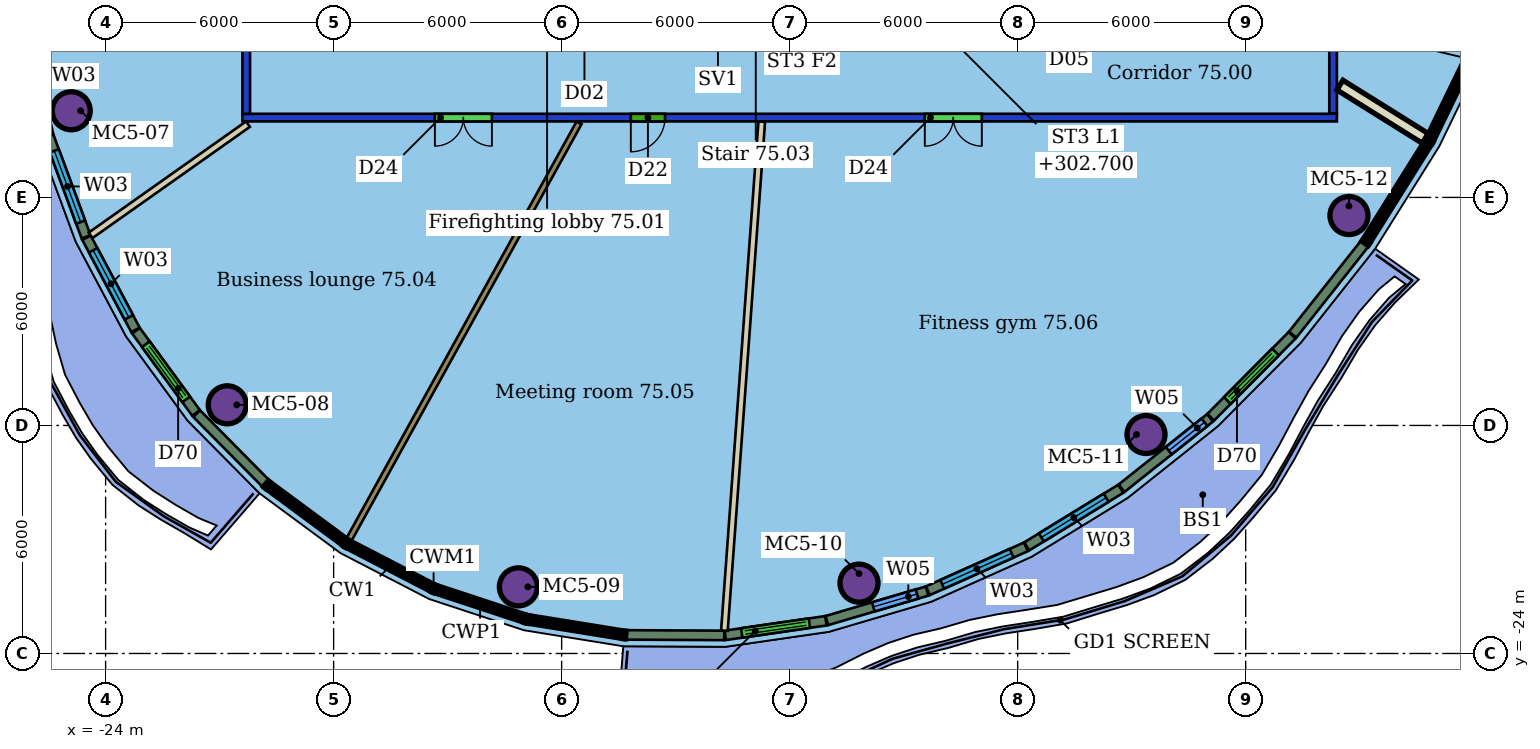
"""IFC4 building model, lengths in metres.
Left out: names, types, materials, properties, quantities, classifications, styles, units other than length and angle.
Written with IfcOpenShell. Run it as: python <this file> out.ifc"""

import sys

from ifc_helpers import new_model, si_unit, direction, frame, frame_2d, origin, origin_2d, place, context, subcontext, project, spatial, rectangle, hollow_circle, extrude, element, fill, save


model = new_model("IFC4")
c1 = context("Model", 3, precision=1e-05, world=origin(), true_north=direction((0.0, 1.0)))
c2 = subcontext(c1, "Body", "Model", "MODEL_VIEW")
j1 = project(units=[si_unit("LENGTHUNIT", "METRE"), si_unit("PLANEANGLEUNIT", "RADIAN")], contexts=[c1])
p1 = place(None, origin())
s1 = spatial("IfcSite", under=j1, at=p1, CompositionType="ELEMENT")
p2 = place(p1, origin())
s2 = spatial("IfcBuilding", under=s1, at=p2, CompositionType="ELEMENT")
p3 = place(p2, frame((0.0, 0.0, 300.9)))
s3 = spatial("IfcBuildingStorey", under=s2, at=p3, CompositionType="ELEMENT", Elevation=300.9)
for number, where, z_axis, x_axis in (
    (1, (-24.906, -9.72, 0.0), (0.0, 0.0, 1.0), (1.0, 0.0, 0.0)),
    (2, (-20.8, -17.457, 0.0), (0.0, 0.0, 1.0), (1.0, 0.0, 0.0)),
    (3, (-13.138, -22.247, 0.0), (0.0, 0.0, 1.0), (1.0, 0.0, 0.0)),
    (4, (-4.175, -22.149, 0.0), (0.0, 0.0, 1.0), (1.0, 0.0, 0.0)),
    (5, (3.377, -18.238, 0.0), (0.0, 0.0, 1.0), (1.0, 0.0, 0.0)),
    (6, (8.718, -12.477, 0.0), (0.0, 0.0, 1.0), (1.0, 0.0, 0.0)),
):
    element("IfcColumn", number, at=place(p3, frame(where, z_axis=z_axis, x_axis=x_axis)), inside=s3, PredefinedType="COLUMN", context=c2, shape_type="SweptSolid", body=[
        extrude(hollow_circle(Radius=0.5, WallThickness=0.04, at=origin_2d()), origin(), (0.0, 0.0, 1.0), 3.4),
    ])
p4 = place(p3, frame((8.4, -9.9, 0.0), z_axis=(0.0, 0.0, 1.0), x_axis=(-1.0, 0.0, 0.0)))
e7 = element("IfcWall", 7, at=p4, inside=s3, PredefinedType="PARTITIONING", context=c2, shape_type="SweptSolid", body=[
    extrude(rectangle(XDim=28.8, YDim=0.2, at=frame_2d((14.4, 0.0))), origin(), (0.0, 0.0, 1.0), 3.05),
])
p5 = place(p4, frame((22.236, 0.0, 0.0)))
e8 = element("IfcOpeningElement", 8, at=p5, cuts=e7, PredefinedType="OPENING", context=c2, shape_type="SweptSolid", body=[
    extrude(rectangle(XDim=1.5, YDim=2.1, at=frame_2d((0.75, 1.05))), frame((0.0, 0.11, 0.0), z_axis=(0.0, -1.0, 0.0), x_axis=(1.0, 0.0, 0.0)), (0.0, 0.0, 1.0), 0.22),
])
p6 = place(p4, frame((17.68, 0.0, 0.0)))
e9 = element("IfcOpeningElement", 9, at=p6, cuts=e7, PredefinedType="OPENING", context=c2, shape_type="SweptSolid", body=[
    extrude(rectangle(XDim=0.9, YDim=2.1, at=frame_2d((0.45, 1.05))), frame((0.0, 0.11, 0.0), z_axis=(0.0, -1.0, 0.0), x_axis=(1.0, 0.0, 0.0)), (0.0, 0.0, 1.0), 0.22),
])
p7 = place(p4, frame((9.344, 0.0, 0.0)))
e10 = element("IfcOpeningElement", 10, at=p7, cuts=e7, PredefinedType="OPENING", context=c2, shape_type="SweptSolid", body=[
    extrude(rectangle(XDim=1.5, YDim=2.1, at=frame_2d((0.75, 1.05))), frame((0.0, 0.11, 0.0), z_axis=(0.0, -1.0, 0.0), x_axis=(1.0, 0.0, 0.0)), (0.0, 0.0, 1.0), 0.22),
])
p8 = place(p3, frame((-20.3, -9.8, 0.0), z_axis=(0.0, 0.0, 1.0), x_axis=(0.0, 1.0, 0.0)))
e11 = element("IfcWall", 11, at=p8, inside=s3, PredefinedType="PARTITIONING", context=c2, shape_type="SweptSolid", body=[
    extrude(rectangle(XDim=19.6, YDim=0.2, at=frame_2d((9.8, 0.0))), origin(), (0.0, 0.0, 1.0), 3.05),
])
p9 = place(p8, frame((11.872, 0.0, 0.0)))
e12 = element("IfcOpeningElement", 12, at=p9, cuts=e11, PredefinedType="OPENING", context=c2, shape_type="SweptSolid", body=[
    extrude(rectangle(XDim=1.5, YDim=2.4, at=frame_2d((0.75, 1.2))), frame((0.0, 0.11, 0.0), z_axis=(0.0, -1.0, 0.0), x_axis=(1.0, 0.0, 0.0)), (0.0, 0.0, 1.0), 0.22),
])
p10 = place(p3, frame((8.3, 9.8, 0.0), z_axis=(0.0, 0.0, 1.0), x_axis=(0.0, -1.0, 0.0)))
e13 = element("IfcWall", 13, at=p10, inside=s3, PredefinedType="PARTITIONING", context=c2, shape_type="SweptSolid", body=[
    extrude(rectangle(XDim=19.6, YDim=0.2, at=frame_2d((9.8, 0.0))), origin(), (0.0, 0.0, 1.0), 3.05),
])
p11 = place(p10, frame((11.636, 0.0, 0.0)))
e14 = element("IfcOpeningElement", 14, at=p11, cuts=e13, PredefinedType="OPENING", context=c2, shape_type="SweptSolid", body=[
    extrude(rectangle(XDim=1.8, YDim=2.4, at=frame_2d((0.9, 1.2))), frame((0.0, 0.11, 0.0), z_axis=(0.0, -1.0, 0.0), x_axis=(1.0, 0.0, 0.0)), (0.0, 0.0, 1.0), 0.22),
])
p12 = place(p3, frame((-24.396, -12.998, 0.0), z_axis=(0.0, 0.0, 1.0), x_axis=(0.816702281695, 0.577059254387, 0.0)))
e15 = element("IfcWall", 15, at=p12, inside=s3, PredefinedType="PARTITIONING", context=c2, shape_type="SweptSolid", body=[
    extrude(rectangle(XDim=5.072, YDim=0.175, at=frame_2d((2.536, 0.0))), origin(), (0.0, 0.0, 1.0), 3.4),
])
p13 = place(p3, frame((-17.594, -20.999, 0.0), z_axis=(0.0, 0.0, 1.0), x_axis=(0.483345323909, 0.87542977894, 0.0)))
e16 = element("IfcWall", 16, at=p13, inside=s3, PredefinedType="PARTITIONING", context=c2, shape_type="SweptSolid", body=[
    extrude(rectangle(XDim=12.523, YDim=0.15, at=frame_2d((6.261, 0.0))), origin(), (0.0, 0.0, 1.0), 3.4),
])
p14 = place(p3, frame((-7.717, -23.4, 0.0), z_axis=(0.0, 0.0, 1.0), x_axis=(0.07318865365, 0.997318114233, 0.0)))
e17 = element("IfcWall", 17, at=p14, inside=s3, PredefinedType="PARTITIONING", context=c2, shape_type="SweptSolid", body=[
    extrude(rectangle(XDim=13.43, YDim=0.175, at=frame_2d((6.715, 0.0))), origin(), (0.0, 0.0, 1.0), 3.4),
])
p15 = place(p3, frame((10.724, -10.447, 0.0), z_axis=(0.0, 0.0, 1.0), x_axis=(-0.848117464959, 0.529808234771, 0.0)))
e18 = element("IfcWall", 18, at=p15, inside=s3, PredefinedType="PARTITIONING", context=c2, shape_type="SweptSolid", body=[
    extrude(rectangle(XDim=2.647, YDim=0.3, at=frame_2d((1.323, 0.0))), origin(), (0.0, 0.0, 1.0), 3.4),
])
p16 = place(p3, frame((-26.147, -7.533, 0.0), z_axis=(0.0, 0.0, 1.0), x_axis=(0.223256314802, -0.974759774458, 0.0)))
e19 = element("IfcWall", 19, at=p16, inside=s3, PredefinedType="SOLIDWALL", context=c2, shape_type="SweptSolid", body=[
    extrude(rectangle(XDim=2.903, YDim=0.25, at=frame_2d((1.452, 0.0))), origin(), (0.0, 0.0, 1.0), 3.1),
])
p17 = place(p16, frame((0.302, 0.0, 0.9)))
e20 = element("IfcOpeningElement", 20, at=p17, cuts=e19, PredefinedType="OPENING", context=c2, shape_type="SweptSolid", body=[
    extrude(rectangle(XDim=2.0, YDim=2.1, at=frame_2d((1.0, 1.05))), frame((0.0, 0.135, 0.0), z_axis=(0.0, -1.0, 0.0), x_axis=(1.0, 0.0, 0.0)), (0.0, 0.0, 1.0), 0.27),
])
p18 = place(p3, frame((-25.492, -10.387, 0.0), z_axis=(0.0, 0.0, 1.0), x_axis=(0.3462418827, -0.938145275885, 0.0)))
e21 = element("IfcWall", 21, at=p18, inside=s3, PredefinedType="SOLIDWALL", context=c2, shape_type="SweptSolid", body=[
    extrude(rectangle(XDim=2.825, YDim=0.25, at=frame_2d((1.413, 0.0))), origin(), (0.0, 0.0, 1.0), 3.1),
])
p19 = place(p18, frame((0.413, 0.0, 0.9)))
e22 = element("IfcOpeningElement", 22, at=p19, cuts=e21, PredefinedType="OPENING", context=c2, shape_type="SweptSolid", body=[
    extrude(rectangle(XDim=2.0, YDim=2.1, at=frame_2d((1.0, 1.05))), frame((0.0, 0.135, 0.0), z_axis=(0.0, -1.0, 0.0), x_axis=(1.0, 0.0, 0.0)), (0.0, 0.0, 1.0), 0.27),
])
p20 = place(p3, frame((-24.504, -13.06, 0.0), z_axis=(0.0, 0.0, 1.0), x_axis=(0.469564356189, -0.882898247476, 0.0)))
e23 = element("IfcWall", 23, at=p20, inside=s3, PredefinedType="SOLIDWALL", context=c2, shape_type="SweptSolid", body=[
    extrude(rectangle(XDim=2.748, YDim=0.25, at=frame_2d((1.374, 0.0))), origin(), (0.0, 0.0, 1.0), 3.1),
])
p21 = place(p20, frame((0.374, 0.0, 0.9)))
e24 = element("IfcOpeningElement", 24, at=p21, cuts=e23, PredefinedType="OPENING", context=c2, shape_type="SweptSolid", body=[
    extrude(rectangle(XDim=2.0, YDim=2.1, at=frame_2d((1.0, 1.05))), frame((0.0, 0.135, 0.0), z_axis=(0.0, -1.0, 0.0), x_axis=(1.0, 0.0, 0.0)), (0.0, 0.0, 1.0), 0.27),
])
p22 = place(p3, frame((-23.2, -15.508, 0.0), z_axis=(0.0, 0.0, 1.0), x_axis=(0.59003031017, -0.80738109532, 0.0)))
e25 = element("IfcWall", 25, at=p22, inside=s3, PredefinedType="SOLIDWALL", context=c2, shape_type="SweptSolid", body=[
    extrude(rectangle(XDim=2.677, YDim=0.25, at=frame_2d((1.338, 0.0))), origin(), (0.0, 0.0, 1.0), 3.1),
])
p23 = place(p22, frame((0.438, 0.0, 0.0)))
e26 = element("IfcOpeningElement", 26, at=p23, cuts=e25, PredefinedType="OPENING", context=c2, shape_type="SweptSolid", body=[
    extrude(rectangle(XDim=1.8, YDim=2.4, at=frame_2d((0.9, 1.2))), frame((0.0, 0.135, 0.0), z_axis=(0.0, -1.0, 0.0), x_axis=(1.0, 0.0, 0.0)), (0.0, 0.0, 1.0), 0.27),
])
p24 = place(p3, frame((-21.603, -17.69, 0.0), z_axis=(0.0, 0.0, 1.0), x_axis=(0.70340049818, -0.71079373883, 0.0)))
e27 = element("IfcWall", 27, at=p24, inside=s3, PredefinedType="SOLIDWALL", context=c2, shape_type="SweptSolid", body=[
    extrude(rectangle(XDim=2.576, YDim=0.25, at=frame_2d((1.288, 0.0))), origin(), (0.0, 0.0, 1.0), 3.1),
])
p25 = place(p3, frame((-10.297, -23.511, 0.0), z_axis=(0.0, 0.0, 1.0), x_axis=(0.999986408608, -0.005213693476, 0.0)))
e28 = element("IfcWall", 28, at=p25, inside=s3, PredefinedType="SOLIDWALL", context=c2, shape_type="SweptSolid", body=[
    extrude(rectangle(XDim=2.575, YDim=0.25, at=frame_2d((1.288, 0.0))), origin(), (0.0, 0.0, 1.0), 3.1),
])
p26 = place(p3, frame((-7.695, -23.523, 0.0), z_axis=(0.0, 0.0, 1.0), x_axis=(0.989681415389, 0.143285365734, 0.0)))
e29 = element("IfcWall", 29, at=p26, inside=s3, PredefinedType="SOLIDWALL", context=c2, shape_type="SweptSolid", body=[
    extrude(rectangle(XDim=2.677, YDim=0.25, at=frame_2d((1.338, 0.0))), origin(), (0.0, 0.0, 1.0), 3.1),
])
p27 = place(p26, frame((0.438, 0.0, 0.0)))
e30 = element("IfcOpeningElement", 30, at=p27, cuts=e29, PredefinedType="OPENING", context=c2, shape_type="SweptSolid", body=[
    extrude(rectangle(XDim=1.8, YDim=2.4, at=frame_2d((0.9, 1.2))), frame((0.0, 0.135, 0.0), z_axis=(0.0, -1.0, 0.0), x_axis=(1.0, 0.0, 0.0)), (0.0, 0.0, 1.0), 0.27),
])
p28 = place(p3, frame((-5.021, -23.134, 0.0), z_axis=(0.0, 0.0, 1.0), x_axis=(0.959345694886, 0.282233657992, 0.0)))
e31 = element("IfcWall", 31, at=p28, inside=s3, PredefinedType="SOLIDWALL", context=c2, shape_type="SweptSolid", body=[
    extrude(rectangle(XDim=2.748, YDim=0.25, at=frame_2d((1.374, 0.0))), origin(), (0.0, 0.0, 1.0), 3.1),
])
p29 = place(p28, frame((1.274, 0.0, 0.9)))
e32 = element("IfcOpeningElement", 32, at=p29, cuts=e31, PredefinedType="OPENING", context=c2, shape_type="SweptSolid", body=[
    extrude(rectangle(XDim=1.2, YDim=2.1, at=frame_2d((0.6, 1.05))), frame((0.0, 0.135, 0.0), z_axis=(0.0, -1.0, 0.0), x_axis=(1.0, 0.0, 0.0)), (0.0, 0.0, 1.0), 0.27),
])
p30 = place(p3, frame((-2.361, -22.35, 0.0), z_axis=(0.0, 0.0, 1.0), x_axis=(0.912517109303, 0.409038537585, 0.0)))
e33 = element("IfcWall", 33, at=p30, inside=s3, PredefinedType="SOLIDWALL", context=c2, shape_type="SweptSolid", body=[
    extrude(rectangle(XDim=2.825, YDim=0.25, at=frame_2d((1.413, 0.0))), origin(), (0.0, 0.0, 1.0), 3.1),
])
p31 = place(p30, frame((0.413, 0.0, 0.9)))
e34 = element("IfcOpeningElement", 34, at=p31, cuts=e33, PredefinedType="OPENING", context=c2, shape_type="SweptSolid", body=[
    extrude(rectangle(XDim=2.0, YDim=2.1, at=frame_2d((1.0, 1.05))), frame((0.0, 0.135, 0.0), z_axis=(0.0, -1.0, 0.0), x_axis=(1.0, 0.0, 0.0)), (0.0, 0.0, 1.0), 0.27),
])
p32 = place(p3, frame((0.238, -21.183, 0.0), z_axis=(0.0, 0.0, 1.0), x_axis=(0.852693082588, 0.522412200189, 0.0)))
e35 = element("IfcWall", 35, at=p32, inside=s3, PredefinedType="SOLIDWALL", context=c2, shape_type="SweptSolid", body=[
    extrude(rectangle(XDim=2.904, YDim=0.25, at=frame_2d((1.452, 0.0))), origin(), (0.0, 0.0, 1.0), 3.1),
])
p33 = place(p32, frame((0.452, 0.0, 0.9)))
e36 = element("IfcOpeningElement", 36, at=p33, cuts=e35, PredefinedType="OPENING", context=c2, shape_type="SweptSolid", body=[
    extrude(rectangle(XDim=2.0, YDim=2.1, at=frame_2d((1.0, 1.05))), frame((0.0, 0.135, 0.0), z_axis=(0.0, -1.0, 0.0), x_axis=(1.0, 0.0, 0.0)), (0.0, 0.0, 1.0), 0.27),
])
p34 = place(p3, frame((2.733, -19.652, 0.0), z_axis=(0.0, 0.0, 1.0), x_axis=(0.782610135425, 0.622512149222, 0.0)))
e37 = element("IfcWall", 37, at=p34, inside=s3, PredefinedType="SOLIDWALL", context=c2, shape_type="SweptSolid", body=[
    extrude(rectangle(XDim=2.977, YDim=0.25, at=frame_2d((1.488, 0.0))), origin(), (0.0, 0.0, 1.0), 3.1),
])
p35 = place(p34, frame((1.588, 0.0, 0.9)))
e38 = element("IfcOpeningElement", 38, at=p35, cuts=e37, PredefinedType="OPENING", context=c2, shape_type="SweptSolid", body=[
    extrude(rectangle(XDim=1.2, YDim=2.1, at=frame_2d((0.6, 1.05))), frame((0.0, 0.135, 0.0), z_axis=(0.0, -1.0, 0.0), x_axis=(1.0, 0.0, 0.0)), (0.0, 0.0, 1.0), 0.27),
])
p36 = place(p3, frame((5.08, -17.784, 0.0), z_axis=(0.0, 0.0, 1.0), x_axis=(0.704653875191, 0.709551207581, 0.0)))
e39 = element("IfcWall", 39, at=p36, inside=s3, PredefinedType="SOLIDWALL", context=c2, shape_type="SweptSolid", body=[
    extrude(rectangle(XDim=3.041, YDim=0.25, at=frame_2d((1.521, 0.0))), origin(), (0.0, 0.0, 1.0), 3.1),
])
p37 = place(p36, frame((0.62, 0.0, 0.0)))
e40 = element("IfcOpeningElement", 40, at=p37, cuts=e39, PredefinedType="OPENING", context=c2, shape_type="SweptSolid", body=[
    extrude(rectangle(XDim=1.8, YDim=2.4, at=frame_2d((0.9, 1.2))), frame((0.0, 0.135, 0.0), z_axis=(0.0, -1.0, 0.0), x_axis=(1.0, 0.0, 0.0)), (0.0, 0.0, 1.0), 0.27),
])
p38 = place(p3, frame((7.237, -15.61, 0.0), z_axis=(0.0, 0.0, 1.0), x_axis=(0.620358215529, 0.784318611551, 0.0)))
e41 = element("IfcWall", 41, at=p38, inside=s3, PredefinedType="SOLIDWALL", context=c2, shape_type="SweptSolid", body=[
    extrude(rectangle(XDim=3.048, YDim=0.25, at=frame_2d((1.524, 0.0))), origin(), (0.0, 0.0, 1.0), 3.1),
])
p39 = place(p5, origin())
e42 = element("IfcDoor", 42, at=p39, inside=s3, OperationType="DOUBLE_DOOR_SINGLE_SWING", PredefinedType="DOOR", context=c2, shape_type="SweptSolid", body=[
    extrude(rectangle(XDim=1.5, YDim=2.1, at=frame_2d((0.75, 1.05))), frame((0.0, 0.025, 0.0), z_axis=(0.0, -1.0, 0.0), x_axis=(1.0, 0.0, 0.0)), (0.0, 0.0, 1.0), 0.05),
])
fill(e8, e42)
p40 = place(p6, origin())
e43 = element("IfcDoor", 43, at=p40, inside=s3, OperationType="SINGLE_SWING_RIGHT", PredefinedType="DOOR", context=c2, shape_type="SweptSolid", body=[
    extrude(rectangle(XDim=0.9, YDim=2.1, at=frame_2d((0.45, 1.05))), frame((0.0, 0.025, 0.0), z_axis=(0.0, -1.0, 0.0), x_axis=(1.0, 0.0, 0.0)), (0.0, 0.0, 1.0), 0.05),
])
fill(e9, e43)
p41 = place(p7, origin())
e44 = element("IfcDoor", 44, at=p41, inside=s3, OperationType="DOUBLE_DOOR_SINGLE_SWING", PredefinedType="DOOR", context=c2, shape_type="SweptSolid", body=[
    extrude(rectangle(XDim=1.5, YDim=2.1, at=frame_2d((0.75, 1.05))), frame((0.0, 0.025, 0.0), z_axis=(0.0, -1.0, 0.0), x_axis=(1.0, 0.0, 0.0)), (0.0, 0.0, 1.0), 0.05),
])
fill(e10, e44)
p42 = place(p19, origin())
e45 = element("IfcWindow", 45, at=p42, inside=s3, PartitioningType="SINGLE_PANEL", PredefinedType="WINDOW", context=c2, shape_type="SweptSolid", body=[
    extrude(rectangle(XDim=2.0, YDim=2.1, at=frame_2d((1.0, 1.05))), frame((0.0, 0.03, 0.0), z_axis=(0.0, -1.0, 0.0), x_axis=(1.0, 0.0, 0.0)), (0.0, 0.0, 1.0), 0.06),
])
fill(e22, e45)
p43 = place(p21, origin())
e46 = element("IfcWindow", 46, at=p43, inside=s3, PartitioningType="SINGLE_PANEL", PredefinedType="WINDOW", context=c2, shape_type="SweptSolid", body=[
    extrude(rectangle(XDim=2.0, YDim=2.1, at=frame_2d((1.0, 1.05))), frame((0.0, 0.03, 0.0), z_axis=(0.0, -1.0, 0.0), x_axis=(1.0, 0.0, 0.0)), (0.0, 0.0, 1.0), 0.06),
])
fill(e24, e46)
p44 = place(p23, origin())
e47 = element("IfcDoor", 47, at=p44, inside=s3, OperationType="DOUBLE_DOOR_SLIDING", PredefinedType="DOOR", context=c2, shape_type="SweptSolid", body=[
    extrude(rectangle(XDim=1.8, YDim=2.4, at=frame_2d((0.9, 1.2))), frame((0.0, 0.025, 0.0), z_axis=(0.0, -1.0, 0.0), x_axis=(1.0, 0.0, 0.0)), (0.0, 0.0, 1.0), 0.05),
])
fill(e26, e47)
p45 = place(p27, origin())
e48 = element("IfcDoor", 48, at=p45, inside=s3, OperationType="DOUBLE_DOOR_SLIDING", PredefinedType="DOOR", context=c2, shape_type="SweptSolid", body=[
    extrude(rectangle(XDim=1.8, YDim=2.4, at=frame_2d((0.9, 1.2))), frame((0.0, 0.025, 0.0), z_axis=(0.0, -1.0, 0.0), x_axis=(1.0, 0.0, 0.0)), (0.0, 0.0, 1.0), 0.05),
])
fill(e30, e48)
p46 = place(p29, origin())
e49 = element("IfcWindow", 49, at=p46, inside=s3, PartitioningType="SINGLE_PANEL", PredefinedType="WINDOW", context=c2, shape_type="SweptSolid", body=[
    extrude(rectangle(XDim=1.2, YDim=2.1, at=frame_2d((0.6, 1.05))), frame((0.0, 0.03, 0.0), z_axis=(0.0, -1.0, 0.0), x_axis=(1.0, 0.0, 0.0)), (0.0, 0.0, 1.0), 0.06),
])
fill(e32, e49)
p47 = place(p31, origin())
e50 = element("IfcWindow", 50, at=p47, inside=s3, PartitioningType="SINGLE_PANEL", PredefinedType="WINDOW", context=c2, shape_type="SweptSolid", body=[
    extrude(rectangle(XDim=2.0, YDim=2.1, at=frame_2d((1.0, 1.05))), frame((0.0, 0.03, 0.0), z_axis=(0.0, -1.0, 0.0), x_axis=(1.0, 0.0, 0.0)), (0.0, 0.0, 1.0), 0.06),
])
fill(e34, e50)
p48 = place(p33, origin())
e51 = element("IfcWindow", 51, at=p48, inside=s3, PartitioningType="SINGLE_PANEL", PredefinedType="WINDOW", context=c2, shape_type="SweptSolid", body=[
    extrude(rectangle(XDim=2.0, YDim=2.1, at=frame_2d((1.0, 1.05))), frame((0.0, 0.03, 0.0), z_axis=(0.0, -1.0, 0.0), x_axis=(1.0, 0.0, 0.0)), (0.0, 0.0, 1.0), 0.06),
])
fill(e36, e51)
p49 = place(p35, origin())
e52 = element("IfcWindow", 52, at=p49, inside=s3, PartitioningType="SINGLE_PANEL", PredefinedType="WINDOW", context=c2, shape_type="SweptSolid", body=[
    extrude(rectangle(XDim=1.2, YDim=2.1, at=frame_2d((0.6, 1.05))), frame((0.0, 0.03, 0.0), z_axis=(0.0, -1.0, 0.0), x_axis=(1.0, 0.0, 0.0)), (0.0, 0.0, 1.0), 0.06),
])
fill(e38, e52)
p50 = place(p37, origin())
e53 = element("IfcDoor", 53, at=p50, inside=s3, OperationType="DOUBLE_DOOR_SLIDING", PredefinedType="DOOR", context=c2, shape_type="SweptSolid", body=[
    extrude(rectangle(XDim=1.8, YDim=2.4, at=frame_2d((0.9, 1.2))), frame((0.0, 0.025, 0.0), z_axis=(0.0, -1.0, 0.0), x_axis=(1.0, 0.0, 0.0)), (0.0, 0.0, 1.0), 0.05),
])
fill(e40, e53)
save(model, sys.argv[1])
